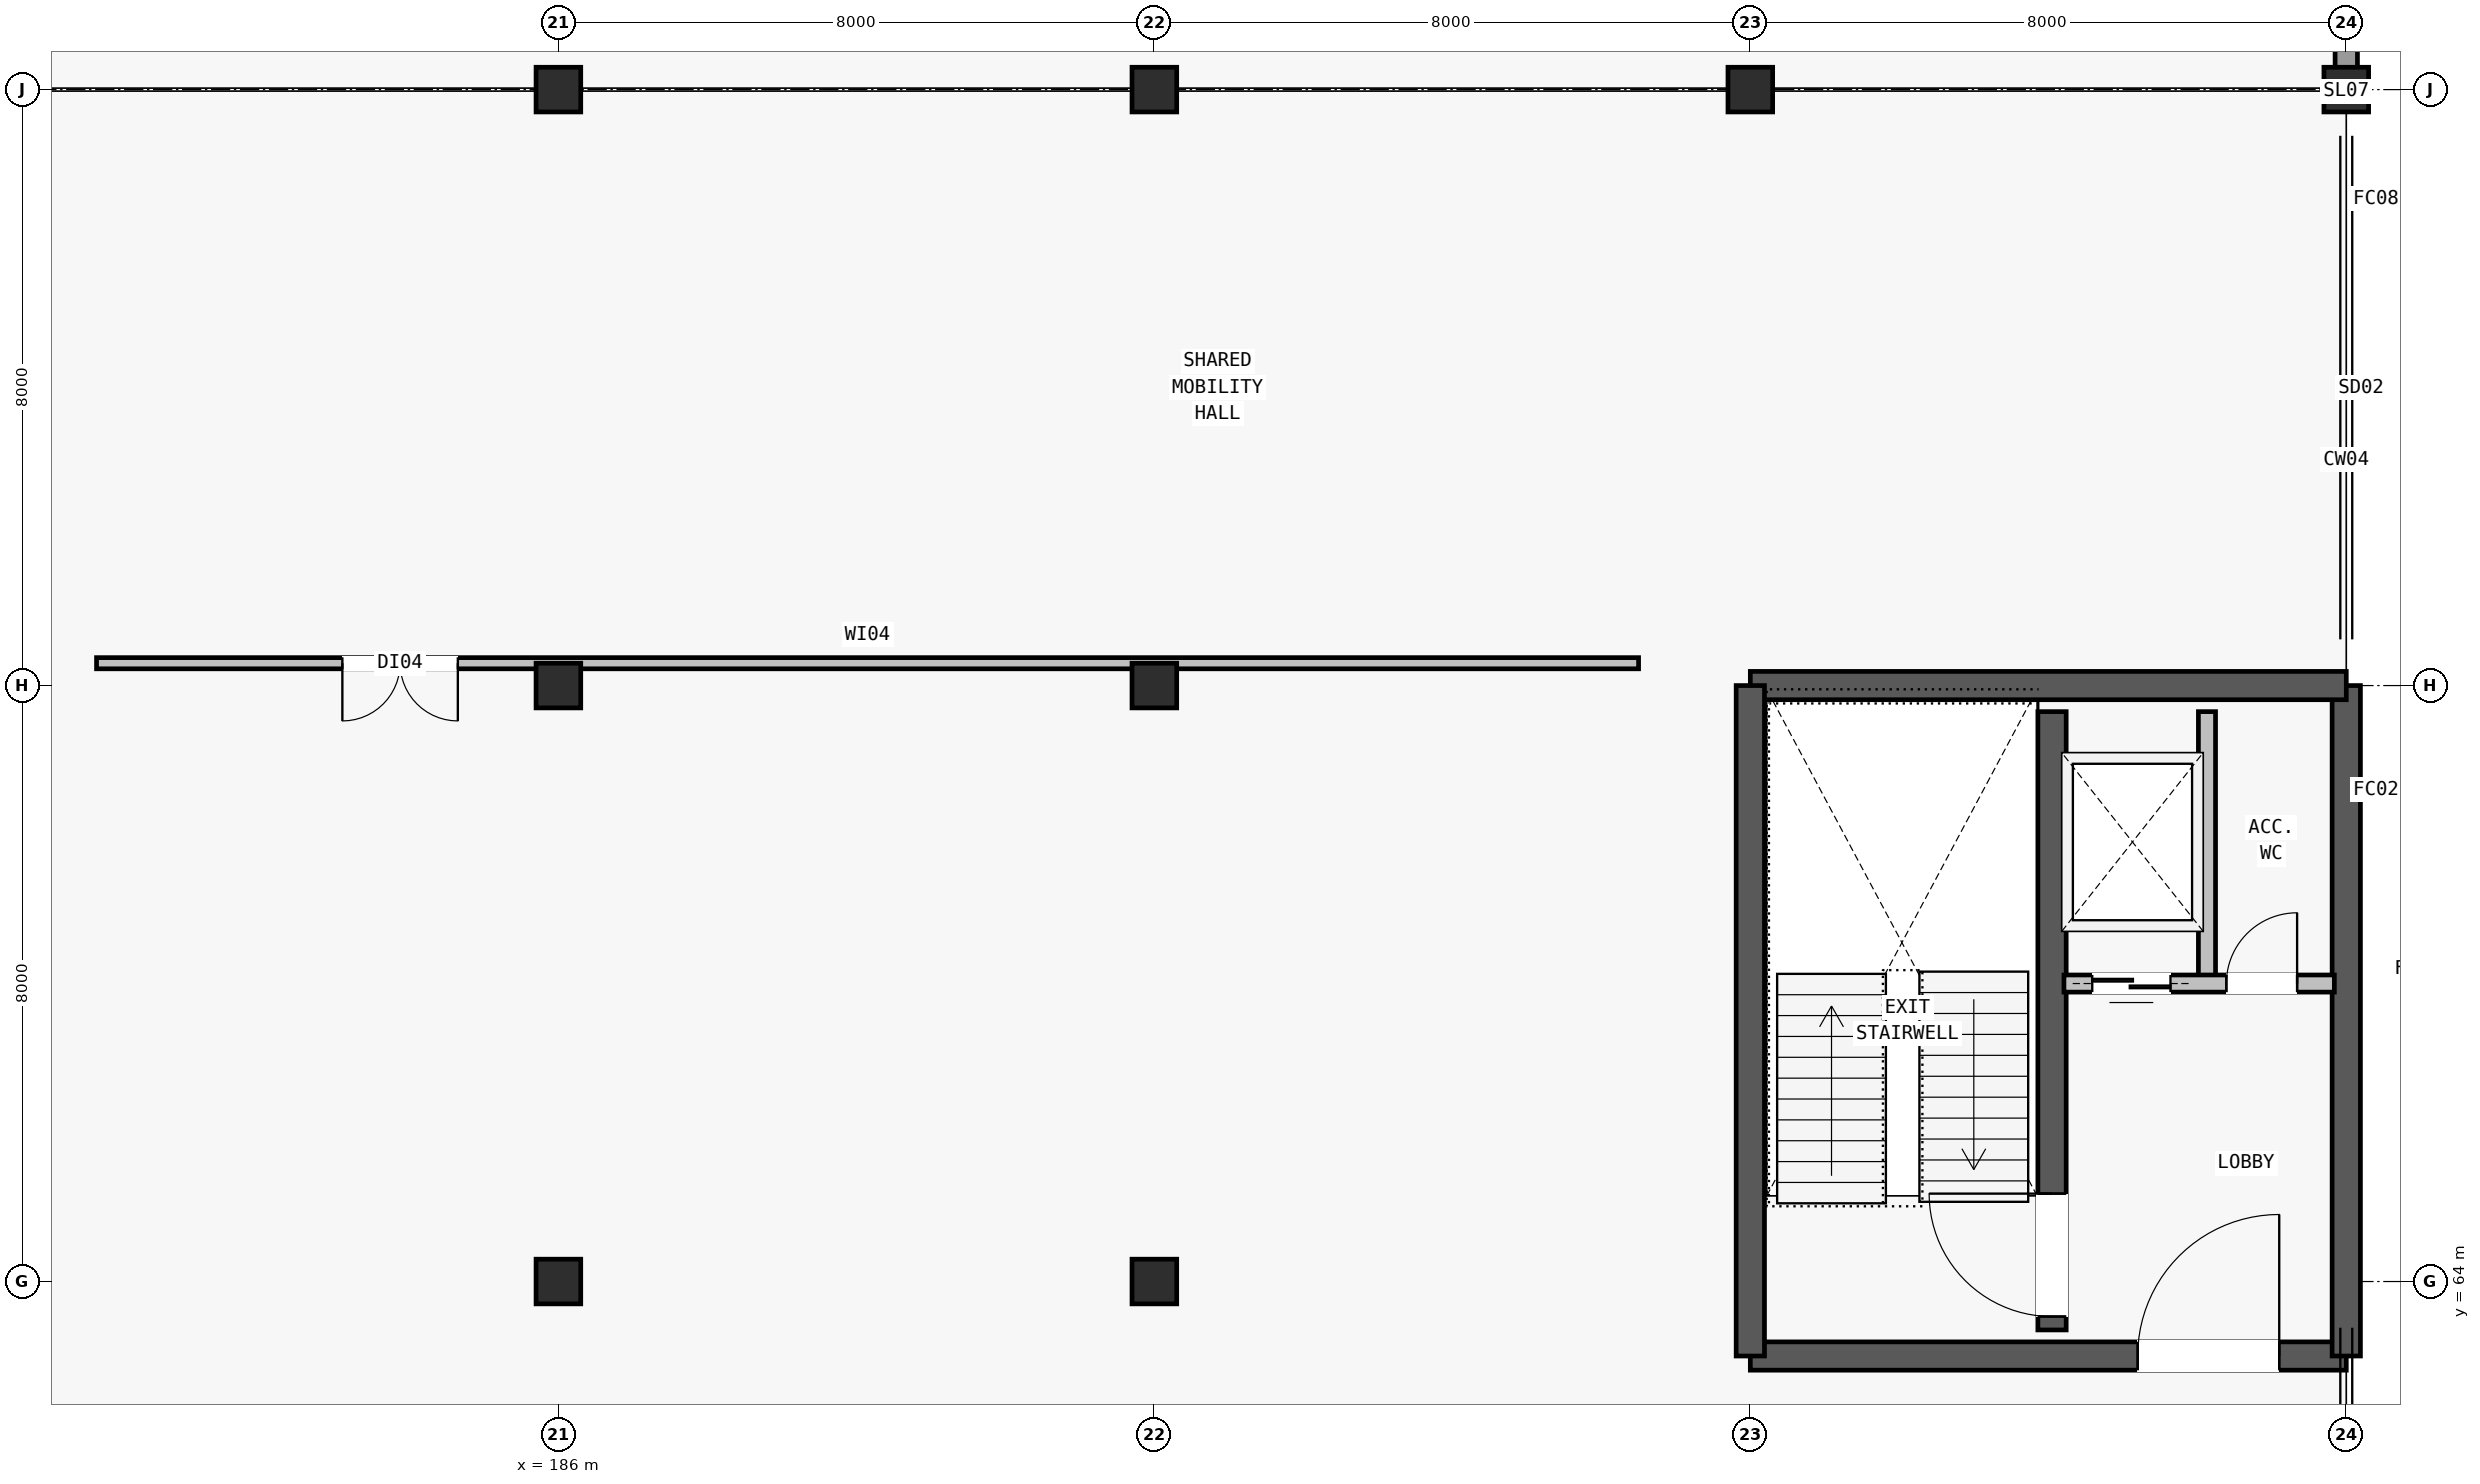
"""IFC4 building model, lengths in metres.
Left out: names, types, materials, properties, quantities, classifications, styles, units other than length and angle.
Written with IfcOpenShell. Run it as: python <this file> out.ifc"""

import sys

from ifc_helpers import new_model, si_unit, direction, frame, frame_2d, origin, origin_2d, place, context, subcontext, project, spatial, rectangle, extrude, element, fill, save


model = new_model("IFC4")
c1 = context("Model", 3, precision=1e-05, world=origin(), true_north=direction((0.0, 1.0)))
c2 = subcontext(c1, "Body", "Model", "MODEL_VIEW")
j1 = project(units=[si_unit("LENGTHUNIT", "METRE"), si_unit("PLANEANGLEUNIT", "RADIAN")], contexts=[c1])
p1 = place(None, origin())
s1 = spatial("IfcSite", under=j1, at=p1, CompositionType="ELEMENT")
p2 = place(p1, origin())
s2 = spatial("IfcBuilding", under=s1, at=p2, CompositionType="ELEMENT")
p3 = place(p2, frame((0.0, 0.0, 5.6)))
s3 = spatial("IfcBuildingStorey", under=s2, at=p3, CompositionType="ELEMENT", Elevation=5.6)
for number, where, z_axis, x_axis in (
    (1, (186.0, 64.0, 0.0), (0.0, 0.0, 1.0), (1.0, 0.0, 0.0)),
    (2, (186.0, 72.0, 0.0), (0.0, 0.0, 1.0), (1.0, 0.0, 0.0)),
    (3, (186.0, 80.0, 0.0), (0.0, 0.0, 1.0), (1.0, 0.0, 0.0)),
    (4, (194.0, 64.0, 0.0), (0.0, 0.0, 1.0), (1.0, 0.0, 0.0)),
    (5, (194.0, 72.0, 0.0), (0.0, 0.0, 1.0), (1.0, 0.0, 0.0)),
    (6, (194.0, 80.0, 0.0), (0.0, 0.0, 1.0), (1.0, 0.0, 0.0)),
    (7, (202.0, 80.0, 0.0), (0.0, 0.0, 1.0), (1.0, 0.0, 0.0)),
    (8, (210.0, 80.0, 0.0), (0.0, 0.0, 1.0), (1.0, 0.0, 0.0)),
):
    element("IfcColumn", number, at=place(p3, frame(where, z_axis=z_axis, x_axis=x_axis)), inside=s3, PredefinedType="COLUMN", context=c2, shape_type="SweptSolid", body=[
        extrude(rectangle(XDim=0.6, YDim=0.6, at=origin_2d()), origin(), (0.0, 0.0, 1.0), 3.9),
    ])
p4 = place(p3, frame((210.0, 80.285, 0.0), z_axis=(0.0, 0.0, 1.0), x_axis=(0.0, 1.0, 0.0)))
e9 = element("IfcWall", 9, at=p4, inside=s3, PredefinedType="STANDARD", context=c2, shape_type="SweptSolid", body=[
    extrude(rectangle(XDim=7.33, YDim=0.3, at=frame_2d((3.665, 0.0))), origin(), (0.0, 0.0, 1.0), 2.48),
])
p5 = place(p3, frame((202.0, 63.0, 0.0), z_axis=(0.0, 0.0, 1.0), x_axis=(1.0, 0.0, 0.0)))
e10 = element("IfcWall", 10, at=p5, inside=s3, PredefinedType="SHEAR", context=c2, shape_type="SweptSolid", body=[
    extrude(rectangle(XDim=8.0, YDim=0.38, at=frame_2d((4.0, 0.0))), origin(), (0.0, 0.0, 1.0), 3.62),
])
p6 = place(p5, frame((5.2, 0.0, 0.0)))
e11 = element("IfcOpeningElement", 11, at=p6, cuts=e10, PredefinedType="OPENING", context=c2, shape_type="SweptSolid", body=[
    extrude(rectangle(XDim=1.9, YDim=2.3, at=frame_2d((0.95, 1.15))), frame((0.0, 0.2, 0.0), z_axis=(0.0, -1.0, 0.0), x_axis=(1.0, 0.0, 0.0)), (0.0, 0.0, 1.0), 0.4),
])
p7 = place(p3, frame((210.0, 63.0, 0.0), z_axis=(0.0, 0.0, 1.0), x_axis=(0.0, 1.0, 0.0)))
e12 = element("IfcWall", 12, at=p7, inside=s3, PredefinedType="SHEAR", context=c2, shape_type="SweptSolid", body=[
    extrude(rectangle(XDim=9.0, YDim=0.38, at=frame_2d((4.5, 0.0))), origin(), (0.0, 0.0, 1.0), 3.62),
])
p8 = place(p3, frame((210.0, 72.0, 0.0), z_axis=(0.0, 0.0, 1.0), x_axis=(-1.0, 0.0, 0.0)))
e13 = element("IfcWall", 13, at=p8, inside=s3, PredefinedType="SHEAR", context=c2, shape_type="SweptSolid", body=[
    extrude(rectangle(XDim=8.0, YDim=0.38, at=frame_2d((4.0, 0.0))), origin(), (0.0, 0.0, 1.0), 3.62),
])
p9 = place(p3, frame((202.0, 72.0, 0.0), z_axis=(0.0, 0.0, 1.0), x_axis=(0.0, -1.0, 0.0)))
e14 = element("IfcWall", 14, at=p9, inside=s3, PredefinedType="SHEAR", context=c2, shape_type="SweptSolid", body=[
    extrude(rectangle(XDim=9.0, YDim=0.38, at=frame_2d((4.5, 0.0))), origin(), (0.0, 0.0, 1.0), 3.62),
])
p10 = place(p3, frame((206.05, 63.35, 0.0), z_axis=(0.0, 0.0, 1.0), x_axis=(0.0, 1.0, 0.0)))
e15 = element("IfcWall", 15, at=p10, inside=s3, PredefinedType="SHEAR", context=c2, shape_type="SweptSolid", body=[
    extrude(rectangle(XDim=8.3, YDim=0.38, at=frame_2d((4.15, 0.0))), origin(), (0.0, 0.0, 1.0), 3.62),
])
p11 = place(p10, frame((0.18, 0.0, 0.0)))
e16 = element("IfcOpeningElement", 16, at=p11, cuts=e15, PredefinedType="OPENING", context=c2, shape_type="SweptSolid", body=[
    extrude(rectangle(XDim=1.65, YDim=2.2, at=frame_2d((0.825, 1.1))), frame((0.0, 0.2, 0.0), z_axis=(0.0, -1.0, 0.0), x_axis=(1.0, 0.0, 0.0)), (0.0, 0.0, 1.0), 0.4),
])
p12 = place(p3, frame((208.13, 68.0, 0.0), z_axis=(0.0, 0.0, 1.0), x_axis=(0.0, 1.0, 0.0)))
e17 = element("IfcWall", 17, at=p12, inside=s3, PredefinedType="PARTITIONING", context=c2, shape_type="SweptSolid", body=[
    extrude(rectangle(XDim=3.65, YDim=0.23, at=frame_2d((1.825, 0.0))), origin(), (0.0, 0.0, 1.0), 2.48),
])
p13 = place(p3, frame((206.21, 68.0, 0.0), z_axis=(0.0, 0.0, 1.0), x_axis=(1.0, 0.0, 0.0)))
e18 = element("IfcWall", 18, at=p13, inside=s3, PredefinedType="PARTITIONING", context=c2, shape_type="SweptSolid", body=[
    extrude(rectangle(XDim=3.63, YDim=0.23, at=frame_2d((1.815, 0.0))), origin(), (0.0, 0.0, 1.0), 2.48),
])
p14 = place(p13, frame((0.38, 0.0, 0.0)))
e19 = element("IfcOpeningElement", 19, at=p14, cuts=e18, PredefinedType="OPENING", context=c2, shape_type="SweptSolid", body=[
    extrude(rectangle(XDim=1.05, YDim=2.15, at=frame_2d((0.525, 1.075))), frame((0.0, 0.125, 0.0), z_axis=(0.0, -1.0, 0.0), x_axis=(1.0, 0.0, 0.0)), (0.0, 0.0, 1.0), 0.25),
])
p15 = place(p13, frame((2.18, 0.0, 0.0)))
e20 = element("IfcOpeningElement", 20, at=p15, cuts=e18, PredefinedType="OPENING", context=c2, shape_type="SweptSolid", body=[
    extrude(rectangle(XDim=0.95, YDim=2.1, at=frame_2d((0.475, 1.05))), frame((0.0, 0.125, 0.0), z_axis=(0.0, -1.0, 0.0), x_axis=(1.0, 0.0, 0.0)), (0.0, 0.0, 1.0), 0.25),
])
p16 = place(p3, frame((179.8, 72.3, 0.0), z_axis=(0.0, 0.0, 1.0), x_axis=(1.0, 0.0, 0.0)))
e21 = element("IfcWall", 21, at=p16, inside=s3, PredefinedType="PARTITIONING", context=c2, shape_type="SweptSolid", body=[
    extrude(rectangle(XDim=20.7, YDim=0.15, at=frame_2d((10.35, 0.0))), origin(), (0.0, 0.0, 1.0), 2.48),
])
p17 = place(p16, frame((3.3, 0.0, 0.0)))
e22 = element("IfcOpeningElement", 22, at=p17, cuts=e21, PredefinedType="OPENING", context=c2, shape_type="SweptSolid", body=[
    extrude(rectangle(XDim=1.55, YDim=2.2, at=frame_2d((0.775, 1.1))), frame((0.0, 0.085, 0.0), z_axis=(0.0, -1.0, 0.0), x_axis=(1.0, 0.0, 0.0)), (0.0, 0.0, 1.0), 0.17),
])
p18 = place(p6, origin())
e23 = element("IfcDoor", 23, at=p18, inside=s3, OperationType="SINGLE_SWING_RIGHT", PredefinedType="DOOR", context=c2, shape_type="SweptSolid", body=[
    extrude(rectangle(XDim=1.9, YDim=2.3, at=frame_2d((0.95, 1.15))), frame((0.0, 0.025, 0.0), z_axis=(0.0, -1.0, 0.0), x_axis=(1.0, 0.0, 0.0)), (0.0, 0.0, 1.0), 0.05),
])
fill(e11, e23)
p19 = place(p11, origin())
e24 = element("IfcDoor", 24, at=p19, inside=s3, OperationType="SINGLE_SWING_RIGHT", PredefinedType="DOOR", context=c2, shape_type="SweptSolid", body=[
    extrude(rectangle(XDim=1.65, YDim=2.2, at=frame_2d((0.825, 1.1))), frame((0.0, 0.025, 0.0), z_axis=(0.0, -1.0, 0.0), x_axis=(1.0, 0.0, 0.0)), (0.0, 0.0, 1.0), 0.05),
])
fill(e16, e24)
p20 = place(p14, origin())
e25 = element("IfcDoor", 25, at=p20, inside=s3, OperationType="SLIDING_TO_LEFT", PredefinedType="DOOR", context=c2, shape_type="SweptSolid", body=[
    extrude(rectangle(XDim=1.05, YDim=2.15, at=frame_2d((0.525, 1.075))), frame((0.0, 0.025, 0.0), z_axis=(0.0, -1.0, 0.0), x_axis=(1.0, 0.0, 0.0)), (0.0, 0.0, 1.0), 0.05),
])
fill(e19, e25)
p21 = place(p15, origin())
e26 = element("IfcDoor", 26, at=p21, inside=s3, OperationType="SINGLE_SWING_RIGHT", PredefinedType="DOOR", context=c2, shape_type="SweptSolid", body=[
    extrude(rectangle(XDim=0.95, YDim=2.1, at=frame_2d((0.475, 1.05))), frame((0.0, 0.025, 0.0), z_axis=(0.0, -1.0, 0.0), x_axis=(1.0, 0.0, 0.0)), (0.0, 0.0, 1.0), 0.05),
])
fill(e20, e26)
p22 = place(p17, origin())
e27 = element("IfcDoor", 27, at=p22, inside=s3, OperationType="DOUBLE_SWING_RIGHT", PredefinedType="DOOR", context=c2, shape_type="SweptSolid", body=[
    extrude(rectangle(XDim=1.55, YDim=2.2, at=frame_2d((0.775, 1.1))), frame((0.0, 0.025, 0.0), z_axis=(0.0, -1.0, 0.0), x_axis=(1.0, 0.0, 0.0)), (0.0, 0.0, 1.0), 0.05),
])
fill(e22, e27)
save(model, sys.argv[1])
